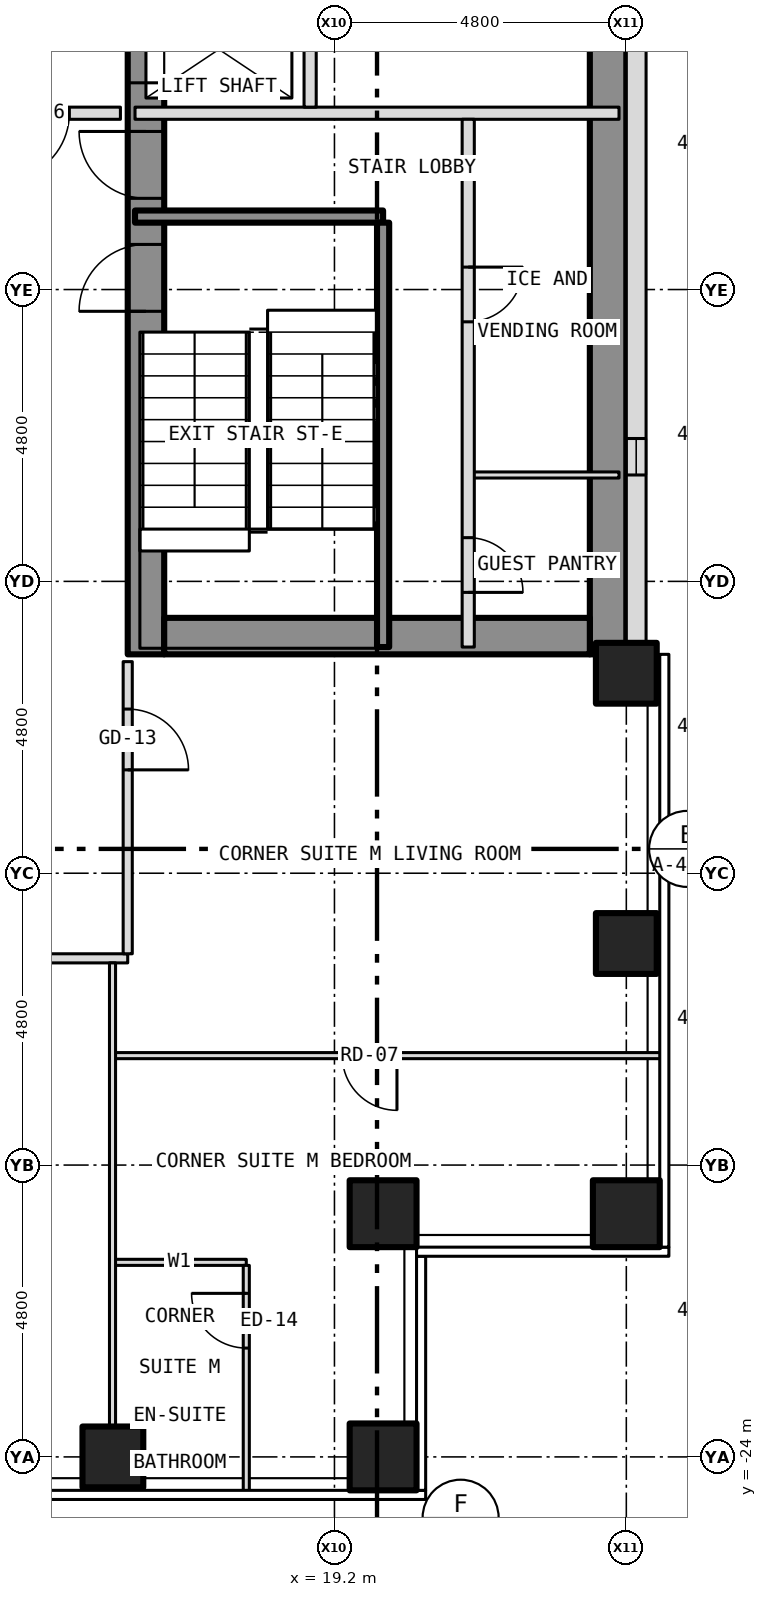
"""IFC4 building model, lengths in metres.
Left out: names, types, materials, properties, quantities, classifications, styles, units other than length and angle.
Written with IfcOpenShell. Run it as: python <this file> out.ifc"""

import sys

from ifc_helpers import new_model, si_unit, direction, frame, frame_2d, origin, origin_2d, place, context, subcontext, project, spatial, rectangle, hollow_rectangle, extrude, element, fill, save


model = new_model("IFC4")
c1 = context("Model", 3, precision=1e-05, world=origin(), true_north=direction((0.0, 1.0)))
c2 = subcontext(c1, "Body", "Model", "MODEL_VIEW")
j1 = project(units=[si_unit("LENGTHUNIT", "METRE"), si_unit("PLANEANGLEUNIT", "RADIAN")], contexts=[c1])
p1 = place(None, origin())
s1 = spatial("IfcSite", under=j1, at=p1, CompositionType="ELEMENT")
p2 = place(p1, origin())
s2 = spatial("IfcBuilding", under=s1, at=p2, CompositionType="ELEMENT")
p3 = place(p2, frame((0.0, 0.0, 39.0)))
s3 = spatial("IfcBuildingStorey", under=s2, at=p3, CompositionType="ELEMENT", Elevation=39.0)
p4 = place(p3, frame((15.556, -24.0, -0.15), z_axis=(0.0, 0.0, 1.0), x_axis=(1.0, 0.0, 0.0)))
e1 = element("IfcColumn", 1, at=p4, inside=s3, PredefinedType="COLUMN", context=c2, shape_type="SweptSolid", body=[
    extrude(hollow_rectangle(XDim=1.0, YDim=1.0, WallThickness=0.06, at=origin_2d()), origin(), (0.0, 0.0, 1.0), 3.5),
])
for number, where, z_axis, x_axis in (
    (2, (20.0, -24.0, -0.15), (0.0, 0.0, 1.0), (1.0, 0.0, 0.0)),
    (3, (24.0, -20.0, -0.15), (0.0, 0.0, 1.0), (1.0, 0.0, 0.0)),
):
    element("IfcColumn", number, at=place(p3, frame(where, z_axis=z_axis, x_axis=x_axis)), inside=s3, PredefinedType="COLUMN", context=c2, shape_type="SweptSolid", body=[
        extrude(hollow_rectangle(XDim=1.1, YDim=1.1, WallThickness=0.065, at=origin_2d()), origin(), (0.0, 0.0, 1.0), 3.5),
    ])
for number, where, z_axis, x_axis in (
    (4, (24.0, -15.556, -0.15), (0.0, 0.0, 1.0), (1.0, 0.0, 0.0)),
    (5, (24.0, -11.111, -0.15), (0.0, 0.0, 1.0), (1.0, 0.0, 0.0)),
):
    element("IfcColumn", number, at=place(p3, frame(where, z_axis=z_axis, x_axis=x_axis)), inside=s3, PredefinedType="COLUMN", context=c2, shape_type="SweptSolid", body=[
        extrude(hollow_rectangle(XDim=1.0, YDim=1.0, WallThickness=0.06, at=origin_2d()), origin(), (0.0, 0.0, 1.0), 3.5),
    ])
p5 = place(p3, frame((20.0, -20.0, -0.15), z_axis=(0.0, 0.0, 1.0), x_axis=(1.0, 0.0, 0.0)))
e6 = element("IfcColumn", 6, at=p5, inside=s3, PredefinedType="COLUMN", context=c2, shape_type="SweptSolid", body=[
    extrude(hollow_rectangle(XDim=1.1, YDim=1.1, WallThickness=0.065, at=origin_2d()), origin(), (0.0, 0.0, 1.0), 3.5),
])
p6 = place(p3, frame((16.1, -10.8, 0.0), z_axis=(0.0, 0.0, 1.0), x_axis=(0.0, 1.0, 0.0)))
e7 = element("IfcWall", 7, at=p6, inside=s3, PredefinedType="SHEAR", context=c2, shape_type="SweptSolid", body=[
    extrude(rectangle(XDim=21.6, YDim=0.6, at=frame_2d((10.8, 0.0))), origin(), (0.0, 0.0, 1.0), 3.25),
])
p7 = place(p6, frame((9.4, 0.0, 0.0)))
e8 = element("IfcOpeningElement", 8, at=p7, cuts=e7, PredefinedType="OPENING", context=c2, shape_type="SweptSolid", body=[
    extrude(rectangle(XDim=1.1, YDim=2.1, at=frame_2d((0.55, 1.05))), frame((0.0, 0.312, 0.0), z_axis=(0.0, -1.0, 0.0), x_axis=(1.0, 0.0, 0.0)), (0.0, 0.0, 1.0), 0.624),
])
p8 = place(p6, frame((11.5, 0.0, 0.0)))
e9 = element("IfcOpeningElement", 9, at=p8, cuts=e7, PredefinedType="OPENING", context=c2, shape_type="SweptSolid", body=[
    extrude(rectangle(XDim=1.1, YDim=2.1, at=frame_2d((0.55, 1.05))), frame((0.0, 0.312, 0.0), z_axis=(0.0, -1.0, 0.0), x_axis=(1.0, 0.0, 0.0)), (0.0, 0.0, 1.0), 0.624),
])
p9 = place(p6, frame((13.6, 0.0, 0.0)))
e10 = element("IfcOpeningElement", 10, at=p9, cuts=e7, PredefinedType="OPENING", context=c2, shape_type="SweptSolid", body=[
    extrude(rectangle(XDim=1.1, YDim=2.1, at=frame_2d((0.55, 1.05))), frame((0.0, 0.312, 0.0), z_axis=(0.0, -1.0, 0.0), x_axis=(1.0, 0.0, 0.0)), (0.0, 0.0, 1.0), 0.624),
])
p10 = place(p6, frame((15.7, 0.0, 0.0)))
e11 = element("IfcOpeningElement", 11, at=p10, cuts=e7, PredefinedType="OPENING", context=c2, shape_type="SweptSolid", body=[
    extrude(rectangle(XDim=1.1, YDim=2.1, at=frame_2d((0.55, 1.05))), frame((0.0, 0.312, 0.0), z_axis=(0.0, -1.0, 0.0), x_axis=(1.0, 0.0, 0.0)), (0.0, 0.0, 1.0), 0.624),
])
p11 = place(p6, frame((17.8, 0.0, 0.0)))
e12 = element("IfcOpeningElement", 12, at=p11, cuts=e7, PredefinedType="OPENING", context=c2, shape_type="SweptSolid", body=[
    extrude(rectangle(XDim=1.1, YDim=2.1, at=frame_2d((0.55, 1.05))), frame((0.0, 0.312, 0.0), z_axis=(0.0, -1.0, 0.0), x_axis=(1.0, 0.0, 0.0)), (0.0, 0.0, 1.0), 0.624),
])
p12 = place(p6, frame((5.642, 0.0, 0.0)))
e13 = element("IfcOpeningElement", 13, at=p12, cuts=e7, PredefinedType="OPENING", context=c2, shape_type="SweptSolid", body=[
    extrude(rectangle(XDim=1.1, YDim=2.1, at=frame_2d((0.55, 1.05))), frame((0.0, 0.312, 0.0), z_axis=(0.0, -1.0, 0.0), x_axis=(1.0, 0.0, 0.0)), (0.0, 0.0, 1.0), 0.624),
])
p13 = place(p6, frame((7.5, 0.0, 0.0)))
e14 = element("IfcOpeningElement", 14, at=p13, cuts=e7, PredefinedType="OPENING", context=c2, shape_type="SweptSolid", body=[
    extrude(rectangle(XDim=1.1, YDim=2.1, at=frame_2d((0.55, 1.05))), frame((0.0, 0.312, 0.0), z_axis=(0.0, -1.0, 0.0), x_axis=(1.0, 0.0, 0.0)), (0.0, 0.0, 1.0), 0.624),
])
p14 = place(p3, frame((23.7, -10.8, 0.0), z_axis=(0.0, 0.0, 1.0), x_axis=(0.0, 1.0, 0.0)))
e15 = element("IfcWall", 15, at=p14, inside=s3, PredefinedType="SHEAR", context=c2, shape_type="SweptSolid", body=[
    extrude(rectangle(XDim=21.6, YDim=0.6, at=frame_2d((10.8, 0.0))), origin(), (0.0, 0.0, 1.0), 3.25),
])
p15 = place(p3, frame((16.4, -10.5, 0.0), z_axis=(0.0, 0.0, 1.0), x_axis=(1.0, 0.0, 0.0)))
e16 = element("IfcWall", 16, at=p15, inside=s3, PredefinedType="SHEAR", context=c2, shape_type="SweptSolid", body=[
    extrude(rectangle(XDim=7.0, YDim=0.6, at=frame_2d((3.5, 0.0))), origin(), (0.0, 0.0, 1.0), 3.25),
])
p16 = place(p3, frame((24.163, -10.8, 0.0), z_axis=(0.0, 0.0, 1.0), x_axis=(0.0, 1.0, 0.0)))
e17 = element("IfcWall", 17, at=p16, inside=s3, PredefinedType="SOLIDWALL", context=c2, shape_type="SweptSolid", body=[
    extrude(rectangle(XDim=21.6, YDim=0.325, at=frame_2d((10.8, 0.0))), origin(), (0.0, 0.0, 1.0), 3.5),
])
p17 = place(p16, frame((2.95, 0.0, 1.0)))
e18 = element("IfcOpeningElement", 18, at=p17, cuts=e17, PredefinedType="OPENING", context=c2, shape_type="SweptSolid", body=[
    extrude(rectangle(XDim=0.6, YDim=1.5, at=frame_2d((0.3, 0.75))), frame((0.0, 0.175, 0.0), z_axis=(0.0, -1.0, 0.0), x_axis=(1.0, 0.0, 0.0)), (0.0, 0.0, 1.0), 0.349),
])
p18 = place(p3, frame((15.55, -20.8, 0.0), z_axis=(0.0, 0.0, 1.0), x_axis=(1.0, 0.0, 0.0)))
e19 = element("IfcWall", 19, at=p18, inside=s3, PredefinedType="PARTITIONING", context=c2, shape_type="SweptSolid", body=[
    extrude(rectangle(XDim=2.2, YDim=0.1, at=frame_2d((1.1, 0.0))), origin(), (0.0, 0.0, 1.0), 3.35),
])
p19 = place(p3, frame((15.55, -17.4, 0.0), z_axis=(0.0, 0.0, 1.0), x_axis=(1.0, 0.0, 0.0)))
e20 = element("IfcWall", 20, at=p19, inside=s3, PredefinedType="PARTITIONING", context=c2, shape_type="SweptSolid", body=[
    extrude(rectangle(XDim=9.03, YDim=0.1, at=frame_2d((4.515, 0.0))), origin(), (0.0, 0.0, 1.0), 3.35),
])
p20 = place(p19, frame((3.778, 0.0, 0.0)))
e21 = element("IfcOpeningElement", 21, at=p20, cuts=e20, PredefinedType="OPENING", context=c2, shape_type="SweptSolid", body=[
    extrude(rectangle(XDim=0.9, YDim=2.1, at=frame_2d((0.45, 1.05))), frame((0.0, 0.062, 0.0), z_axis=(0.0, -1.0, 0.0), x_axis=(1.0, 0.0, 0.0)), (0.0, 0.0, 1.0), 0.124),
])
p21 = place(p3, frame((-15.8, -15.8, 0.0), z_axis=(0.0, 0.0, 1.0), x_axis=(1.0, 0.0, 0.0)))
e22 = element("IfcWall", 22, at=p21, inside=s3, PredefinedType="PARTITIONING", context=c2, shape_type="SweptSolid", body=[
    extrude(rectangle(XDim=31.6, YDim=0.15, at=frame_2d((15.8, 0.0))), origin(), (0.0, 0.0, 1.0), 3.35),
])
p22 = place(p21, frame((6.633, 0.0, 0.0)))
e23 = element("IfcOpeningElement", 23, at=p22, cuts=e22, PredefinedType="OPENING", context=c2, shape_type="SweptSolid", body=[
    extrude(rectangle(XDim=1.0, YDim=2.1, at=frame_2d((0.5, 1.05))), frame((0.0, 0.087, 0.0), z_axis=(0.0, -1.0, 0.0), x_axis=(1.0, 0.0, 0.0)), (0.0, 0.0, 1.0), 0.174),
])
p23 = place(p21, frame((11.956, 0.0, 0.0)))
e24 = element("IfcOpeningElement", 24, at=p23, cuts=e22, PredefinedType="OPENING", context=c2, shape_type="SweptSolid", body=[
    extrude(rectangle(XDim=1.0, YDim=2.1, at=frame_2d((0.5, 1.05))), frame((0.0, 0.087, 0.0), z_axis=(0.0, -1.0, 0.0), x_axis=(1.0, 0.0, 0.0)), (0.0, 0.0, 1.0), 0.174),
])
p24 = place(p21, frame((16.4, 0.0, 0.0)))
e25 = element("IfcOpeningElement", 25, at=p24, cuts=e22, PredefinedType="OPENING", context=c2, shape_type="SweptSolid", body=[
    extrude(rectangle(XDim=1.0, YDim=2.1, at=frame_2d((0.5, 1.05))), frame((0.0, 0.087, 0.0), z_axis=(0.0, -1.0, 0.0), x_axis=(1.0, 0.0, 0.0)), (0.0, 0.0, 1.0), 0.174),
])
p25 = place(p21, frame((21.956, 0.0, 0.0)))
e26 = element("IfcOpeningElement", 26, at=p25, cuts=e22, PredefinedType="OPENING", context=c2, shape_type="SweptSolid", body=[
    extrude(rectangle(XDim=1.0, YDim=2.1, at=frame_2d((0.5, 1.05))), frame((0.0, 0.087, 0.0), z_axis=(0.0, -1.0, 0.0), x_axis=(1.0, 0.0, 0.0)), (0.0, 0.0, 1.0), 0.174),
])
p26 = place(p21, frame((28.623, 0.0, 0.0)))
e27 = element("IfcOpeningElement", 27, at=p26, cuts=e22, PredefinedType="OPENING", context=c2, shape_type="SweptSolid", body=[
    extrude(rectangle(XDim=1.0, YDim=2.1, at=frame_2d((0.5, 1.05))), frame((0.0, 0.087, 0.0), z_axis=(0.0, -1.0, 0.0), x_axis=(1.0, 0.0, 0.0)), (0.0, 0.0, 1.0), 0.174),
])
p27 = place(p3, frame((21.4, -7.85, 0.0), z_axis=(0.0, 0.0, 1.0), x_axis=(1.0, 0.0, 0.0)))
e28 = element("IfcWall", 28, at=p27, inside=s3, PredefinedType="PARTITIONING", context=c2, shape_type="SweptSolid", body=[
    extrude(rectangle(XDim=2.48, YDim=0.1, at=frame_2d((1.24, 0.0))), origin(), (0.0, 0.0, 1.0), 3.25),
])
p28 = place(p3, frame((15.92, -3.6, 0.0), z_axis=(0.0, 0.0, 1.0), x_axis=(1.0, 0.0, 0.0)))
e29 = element("IfcWall", 29, at=p28, inside=s3, PredefinedType="SHEAR", context=c2, shape_type="SweptSolid", body=[
    extrude(rectangle(XDim=4.08, YDim=0.2, at=frame_2d((2.04, 0.0))), origin(), (0.0, 0.0, 1.0), 3.25),
])
p29 = place(p3, frame((12.4, -1.9, 0.0), z_axis=(0.0, 0.0, 1.0), x_axis=(1.0, 0.0, 0.0)))
e30 = element("IfcWall", 30, at=p29, inside=s3, PredefinedType="PARTITIONING", context=c2, shape_type="SweptSolid", body=[
    extrude(rectangle(XDim=3.28, YDim=0.2, at=frame_2d((1.64, 0.0))), origin(), (0.0, 0.0, 1.0), 3.35),
])
p30 = place(p29, frame((1.34, 0.0, 0.0)))
e31 = element("IfcOpeningElement", 31, at=p30, cuts=e30, PredefinedType="OPENING", context=c2, shape_type="SweptSolid", body=[
    extrude(rectangle(XDim=1.1, YDim=2.1, at=frame_2d((0.55, 1.05))), frame((0.0, 0.112, 0.0), z_axis=(0.0, -1.0, 0.0), x_axis=(1.0, 0.0, 0.0)), (0.0, 0.0, 1.0), 0.224),
])
p31 = place(p3, frame((15.92, -1.9, 0.0), z_axis=(0.0, 0.0, 1.0), x_axis=(1.0, 0.0, 0.0)))
e32 = element("IfcWall", 32, at=p31, inside=s3, PredefinedType="PARTITIONING", context=c2, shape_type="SweptSolid", body=[
    extrude(rectangle(XDim=7.96, YDim=0.2, at=frame_2d((3.98, 0.0))), origin(), (0.0, 0.0, 1.0), 3.25),
])
p32 = place(p3, frame((15.55, -23.88, 0.0), z_axis=(0.0, 0.0, 1.0), x_axis=(0.0, 1.0, 0.0)))
e33 = element("IfcWall", 33, at=p32, inside=s3, PredefinedType="PARTITIONING", context=c2, shape_type="SweptSolid", body=[
    extrude(rectangle(XDim=8.005, YDim=0.1, at=frame_2d((4.002, 0.0))), origin(), (0.0, 0.0, 1.0), 3.35),
])
p33 = place(p3, frame((15.8, -15.725, 0.0), z_axis=(0.0, 0.0, 1.0), x_axis=(0.0, 1.0, 0.0)))
e34 = element("IfcWall", 34, at=p33, inside=s3, PredefinedType="PARTITIONING", context=c2, shape_type="SweptSolid", body=[
    extrude(rectangle(XDim=4.805, YDim=0.15, at=frame_2d((2.403, 0.0))), origin(), (0.0, 0.0, 1.0), 3.35),
])
p34 = place(p33, frame((3.025, 0.0, 0.0)))
e35 = element("IfcOpeningElement", 35, at=p34, cuts=e34, PredefinedType="OPENING", context=c2, shape_type="SweptSolid", body=[
    extrude(rectangle(XDim=1.0, YDim=2.1, at=frame_2d((0.5, 1.05))), frame((0.0, 0.087, 0.0), z_axis=(0.0, -1.0, 0.0), x_axis=(1.0, 0.0, 0.0)), (0.0, 0.0, 1.0), 0.174),
])
p35 = place(p3, frame((17.75, -24.58, 0.0), z_axis=(0.0, 0.0, 1.0), x_axis=(0.0, 1.0, 0.0)))
e36 = element("IfcWall", 36, at=p35, inside=s3, PredefinedType="PARTITIONING", context=c2, shape_type="SweptSolid", body=[
    extrude(rectangle(XDim=3.73, YDim=0.1, at=frame_2d((1.865, 0.0))), origin(), (0.0, 0.0, 1.0), 3.35),
])
p36 = place(p35, frame((2.37, 0.0, 0.0)))
e37 = element("IfcOpeningElement", 37, at=p36, cuts=e36, PredefinedType="OPENING", context=c2, shape_type="SweptSolid", body=[
    extrude(rectangle(XDim=0.9, YDim=2.1, at=frame_2d((0.45, 1.05))), frame((0.0, 0.062, 0.0), z_axis=(0.0, -1.0, 0.0), x_axis=(1.0, 0.0, 0.0)), (0.0, 0.0, 1.0), 0.124),
])
p37 = place(p3, frame((18.8, -1.8, 0.0), z_axis=(0.0, 0.0, 1.0), x_axis=(0.0, 1.0, 0.0)))
e38 = element("IfcWall", 38, at=p37, inside=s3, PredefinedType="PARTITIONING", context=c2, shape_type="SweptSolid", body=[
    extrude(rectangle(XDim=12.48, YDim=0.2, at=frame_2d((6.24, 0.0))), origin(), (0.0, 0.0, 1.0), 3.25),
])
p38 = place(p3, frame((20.0, -10.68, 0.0), z_axis=(0.0, 0.0, 1.0), x_axis=(0.0, 1.0, 0.0)))
e39 = element("IfcWall", 39, at=p38, inside=s3, PredefinedType="SHEAR", context=c2, shape_type="SweptSolid", body=[
    extrude(rectangle(XDim=6.98, YDim=0.2, at=frame_2d((3.49, 0.0))), origin(), (0.0, 0.0, 1.0), 3.25),
])
p39 = place(p3, frame((21.4, -10.68, 0.0), z_axis=(0.0, 0.0, 1.0), x_axis=(0.0, 1.0, 0.0)))
e40 = element("IfcWall", 40, at=p39, inside=s3, PredefinedType="PARTITIONING", context=c2, shape_type="SweptSolid", body=[
    extrude(rectangle(XDim=8.68, YDim=0.2, at=frame_2d((4.34, 0.0))), origin(), (0.0, 0.0, 1.0), 3.25),
])
p40 = place(p39, frame((0.899, 0.0, 0.0)))
e41 = element("IfcOpeningElement", 41, at=p40, cuts=e40, PredefinedType="OPENING", context=c2, shape_type="SweptSolid", body=[
    extrude(rectangle(XDim=0.9, YDim=2.1, at=frame_2d((0.45, 1.05))), frame((0.0, 0.112, 0.0), z_axis=(0.0, -1.0, 0.0), x_axis=(1.0, 0.0, 0.0)), (0.0, 0.0, 1.0), 0.224),
])
p41 = place(p39, frame((5.349, 0.0, 0.0)))
e42 = element("IfcOpeningElement", 42, at=p41, cuts=e40, PredefinedType="OPENING", context=c2, shape_type="SweptSolid", body=[
    extrude(rectangle(XDim=0.9, YDim=2.1, at=frame_2d((0.45, 1.05))), frame((0.0, 0.112, 0.0), z_axis=(0.0, -1.0, 0.0), x_axis=(1.0, 0.0, 0.0)), (0.0, 0.0, 1.0), 0.224),
])
p42 = place(p17, origin())
e43 = element("IfcWindow", 43, at=p42, inside=s3, PartitioningType="SINGLE_PANEL", PredefinedType="WINDOW", context=c2, shape_type="SweptSolid", body=[
    extrude(rectangle(XDim=0.6, YDim=1.5, at=frame_2d((0.3, 0.75))), frame((0.0, -0.073, 0.0), z_axis=(0.0, -1.0, 0.0), x_axis=(1.0, 0.0, 0.0)), (0.0, 0.0, 1.0), 0.06),
])
fill(e18, e43)
p43 = place(p7, origin())
e44 = element("IfcDoor", 44, at=p43, inside=s3, OperationType="SLIDING_TO_LEFT", PredefinedType="DOOR", context=c2, shape_type="SweptSolid", body=[
    extrude(rectangle(XDim=1.1, YDim=2.1, at=frame_2d((0.55, 1.05))), frame((0.0, 0.025, 0.0), z_axis=(0.0, -1.0, 0.0), x_axis=(1.0, 0.0, 0.0)), (0.0, 0.0, 1.0), 0.05),
])
fill(e8, e44)
p44 = place(p12, origin())
e45 = element("IfcDoor", 45, at=p44, inside=s3, OperationType="SINGLE_SWING_LEFT", PredefinedType="DOOR", context=c2, shape_type="SweptSolid", body=[
    extrude(rectangle(XDim=1.1, YDim=2.1, at=frame_2d((0.55, 1.05))), frame((0.0, 0.025, 0.0), z_axis=(0.0, -1.0, 0.0), x_axis=(1.0, 0.0, 0.0)), (0.0, 0.0, 1.0), 0.05),
])
fill(e13, e45)
p45 = place(p13, origin())
e46 = element("IfcDoor", 46, at=p45, inside=s3, OperationType="SINGLE_SWING_RIGHT", PredefinedType="DOOR", context=c2, shape_type="SweptSolid", body=[
    extrude(rectangle(XDim=1.1, YDim=2.1, at=frame_2d((0.55, 1.05))), frame((0.0, 0.025, 0.0), z_axis=(0.0, -1.0, 0.0), x_axis=(1.0, 0.0, 0.0)), (0.0, 0.0, 1.0), 0.05),
])
fill(e14, e46)
p46 = place(p40, origin())
e47 = element("IfcDoor", 47, at=p46, inside=s3, OperationType="SINGLE_SWING_LEFT", PredefinedType="DOOR", context=c2, shape_type="SweptSolid", body=[
    extrude(rectangle(XDim=0.9, YDim=2.1, at=frame_2d((0.45, 1.05))), frame((0.0, 0.025, 0.0), z_axis=(0.0, -1.0, 0.0), x_axis=(1.0, 0.0, 0.0)), (0.0, 0.0, 1.0), 0.05),
])
fill(e41, e47)
p47 = place(p41, origin())
e48 = element("IfcDoor", 48, at=p47, inside=s3, OperationType="SINGLE_SWING_RIGHT", PredefinedType="DOOR", context=c2, shape_type="SweptSolid", body=[
    extrude(rectangle(XDim=0.9, YDim=2.1, at=frame_2d((0.45, 1.05))), frame((0.0, 0.025, 0.0), z_axis=(0.0, -1.0, 0.0), x_axis=(1.0, 0.0, 0.0)), (0.0, 0.0, 1.0), 0.05),
])
fill(e42, e48)
p48 = place(p30, origin())
e49 = element("IfcDoor", 49, at=p48, inside=s3, OperationType="SINGLE_SWING_LEFT", PredefinedType="DOOR", context=c2, shape_type="SweptSolid", body=[
    extrude(rectangle(XDim=1.1, YDim=2.1, at=frame_2d((0.55, 1.05))), frame((0.0, 0.025, 0.0), z_axis=(0.0, -1.0, 0.0), x_axis=(1.0, 0.0, 0.0)), (0.0, 0.0, 1.0), 0.05),
])
fill(e31, e49)
p49 = place(p34, origin())
e50 = element("IfcDoor", 50, at=p49, inside=s3, OperationType="SINGLE_SWING_LEFT", PredefinedType="DOOR", context=c2, shape_type="SweptSolid", body=[
    extrude(rectangle(XDim=1.0, YDim=2.1, at=frame_2d((0.5, 1.05))), frame((0.0, 0.025, 0.0), z_axis=(0.0, -1.0, 0.0), x_axis=(1.0, 0.0, 0.0)), (0.0, 0.0, 1.0), 0.05),
])
fill(e35, e50)
p50 = place(p20, origin())
e51 = element("IfcDoor", 51, at=p50, inside=s3, OperationType="SINGLE_SWING_RIGHT", PredefinedType="DOOR", context=c2, shape_type="SweptSolid", body=[
    extrude(rectangle(XDim=0.9, YDim=2.1, at=frame_2d((0.45, 1.05))), frame((0.0, 0.025, 0.0), z_axis=(0.0, -1.0, 0.0), x_axis=(1.0, 0.0, 0.0)), (0.0, 0.0, 1.0), 0.05),
])
fill(e21, e51)
p51 = place(p36, origin())
e52 = element("IfcDoor", 52, at=p51, inside=s3, OperationType="SINGLE_SWING_RIGHT", PredefinedType="DOOR", context=c2, shape_type="SweptSolid", body=[
    extrude(rectangle(XDim=0.9, YDim=2.1, at=frame_2d((0.45, 1.05))), frame((0.0, 0.025, 0.0), z_axis=(0.0, -1.0, 0.0), x_axis=(1.0, 0.0, 0.0)), (0.0, 0.0, 1.0), 0.05),
])
fill(e37, e52)
save(model, sys.argv[1])
